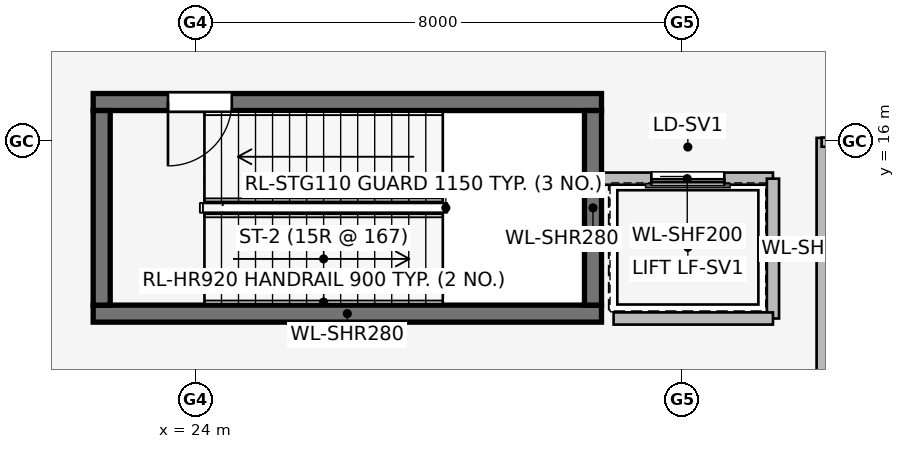
"""IFC4 building model, lengths in metres.
Left out: names, types, materials, properties, quantities, classifications, styles, units other than length and angle.
Written with IfcOpenShell. Run it as: python <this file> out.ifc"""

import sys

from ifc_helpers import new_model, si_unit, direction, frame, frame_2d, origin, place, context, subcontext, project, spatial, rectangle, extrude, element, fill, save


model = new_model("IFC4")
c1 = context("Model", 3, precision=1e-05, world=origin(), true_north=direction((0.0, 1.0)))
c2 = subcontext(c1, "Body", "Model", "MODEL_VIEW")
j1 = project(units=[si_unit("LENGTHUNIT", "METRE"), si_unit("PLANEANGLEUNIT", "RADIAN")], contexts=[c1])
p1 = place(None, origin())
s1 = spatial("IfcSite", under=j1, at=p1, CompositionType="ELEMENT")
p2 = place(p1, origin())
s2 = spatial("IfcBuilding", under=s1, at=p2, CompositionType="ELEMENT")
p3 = place(p2, frame((0.0, 0.0, 16.0)))
s3 = spatial("IfcBuildingStorey", under=s2, at=p3, CompositionType="ELEMENT", Elevation=16.0)
p4 = place(p3, frame((22.32, 13.16, 0.0), z_axis=(0.0, 0.0, 1.0), x_axis=(1.0, 0.0, 0.0)))
e1 = element("IfcWall", 1, at=p4, inside=s3, PredefinedType="SHEAR", context=c2, shape_type="SweptSolid", body=[
    extrude(rectangle(XDim=8.36, YDim=0.28, at=frame_2d((4.18, 0.0))), origin(), (0.0, 0.0, 1.0), 5.0),
])
p5 = place(p3, frame((30.68, 16.64, 0.0), z_axis=(0.0, 0.0, 1.0), x_axis=(-1.0, 0.0, 0.0)))
e2 = element("IfcWall", 2, at=p5, inside=s3, PredefinedType="SHEAR", context=c2, shape_type="SweptSolid", body=[
    extrude(rectangle(XDim=8.36, YDim=0.28, at=frame_2d((4.18, 0.0))), origin(), (0.0, 0.0, 1.0), 5.0),
])
p6 = place(p5, frame((6.08, 0.0, 0.0)))
e3 = element("IfcOpeningElement", 3, at=p6, cuts=e2, PredefinedType="OPENING", context=c2, shape_type="SweptSolid", body=[
    extrude(rectangle(XDim=1.05, YDim=2.0, at=frame_2d((0.525, 1.0))), frame((0.0, 0.15, 0.0), z_axis=(0.0, -1.0, 0.0), x_axis=(1.0, 0.0, 0.0)), (0.0, 0.0, 1.0), 0.3),
])
for number, where, z_axis, x_axis in (
    (4, (22.46, 16.5, 0.0), (0.0, 0.0, 1.0), (0.0, -1.0, 0.0)),
    (5, (30.54, 13.3, 0.0), (0.0, 0.0, 1.0), (0.0, 1.0, 0.0)),
):
    element("IfcWall", number, at=place(p3, frame(where, z_axis=z_axis, x_axis=x_axis)), inside=s3, PredefinedType="SHEAR", context=c2, shape_type="SweptSolid", body=[
        extrude(rectangle(XDim=3.2, YDim=0.28, at=frame_2d((1.6, 0.0))), origin(), (0.0, 0.0, 1.0), 5.0),
    ])
p7 = place(p3, frame((33.5, 15.38, 0.0), z_axis=(0.0, 0.0, 1.0), x_axis=(-1.0, 0.0, 0.0)))
e6 = element("IfcWall", 6, at=p7, inside=s3, PredefinedType="PARTITIONING", context=c2, shape_type="SweptSolid", body=[
    extrude(rectangle(XDim=2.82, YDim=0.2, at=frame_2d((1.41, 0.0))), origin(), (0.0, 0.0, 1.0), 4.58),
])
p8 = place(p7, frame((0.8, 0.0, 0.0)))
e7 = element("IfcOpeningElement", 7, at=p8, cuts=e6, PredefinedType="OPENING", context=c2, shape_type="SweptSolid", body=[
    extrude(rectangle(XDim=1.2, YDim=2.2, at=frame_2d((0.6, 1.1))), frame((0.0, 0.11, 0.0), z_axis=(0.0, -1.0, 0.0), x_axis=(1.0, 0.0, 0.0)), (0.0, 0.0, 1.0), 0.22),
])
p9 = place(p3, frame((33.5, 13.08, 0.0), z_axis=(0.0, 0.0, 1.0), x_axis=(0.0, 1.0, 0.0)))
e8 = element("IfcWall", 8, at=p9, inside=s3, PredefinedType="PARTITIONING", context=c2, shape_type="SweptSolid", body=[
    extrude(rectangle(XDim=2.3, YDim=0.2, at=frame_2d((1.15, 0.0))), origin(), (0.0, 0.0, 1.0), 4.58),
])
p10 = place(p3, frame((30.879, 13.08, 0.0), z_axis=(0.0, 0.0, 1.0), x_axis=(1.0, 0.0, 0.0)))
e9 = element("IfcWall", 9, at=p10, inside=s3, PredefinedType="PARTITIONING", context=c2, shape_type="SweptSolid", body=[
    extrude(rectangle(XDim=2.621, YDim=0.2, at=frame_2d((1.311, 0.0))), origin(), (0.0, 0.0, 1.0), 4.58),
])
p11 = place(p3, frame((34.3, 0.24, 0.0), z_axis=(0.0, 0.0, 1.0), x_axis=(0.0, 1.0, 0.0)))
e10 = element("IfcWall", 10, at=p11, inside=s3, PredefinedType="PARTITIONING", context=c2, shape_type="SweptSolid", body=[
    extrude(rectangle(XDim=15.81, YDim=0.165, at=frame_2d((7.905, 0.0))), origin(), (0.0, 0.0, 1.0), 4.58),
])
p12 = place(p3, frame((34.3, 15.98, 0.0), z_axis=(0.0, 0.0, 1.0), x_axis=(1.0, 0.0, 0.0)))
e11 = element("IfcWall", 11, at=p12, inside=s3, PredefinedType="PARTITIONING", context=c2, shape_type="SweptSolid", body=[
    extrude(rectangle(XDim=12.312, YDim=0.15, at=frame_2d((6.156, 0.0))), origin(), (0.0, 0.0, 1.0), 3.632),
])
p13 = place(p12, frame((5.676, 0.0, 0.0)))
e12 = element("IfcOpeningElement", 12, at=p13, cuts=e11, PredefinedType="OPENING", context=c2, shape_type="SweptSolid", body=[
    extrude(rectangle(XDim=0.96, YDim=2.0, at=frame_2d((0.48, 1.0))), frame((0.0, 0.085, 0.0), z_axis=(0.0, -1.0, 0.0), x_axis=(1.0, 0.0, 0.0)), (0.0, 0.0, 1.0), 0.17),
])
p14 = place(p6, origin())
e13 = element("IfcDoor", 13, at=p14, inside=s3, OperationType="SINGLE_SWING_RIGHT", PredefinedType="DOOR", context=c2, shape_type="SweptSolid", body=[
    extrude(rectangle(XDim=1.05, YDim=2.0, at=frame_2d((0.525, 1.0))), frame((0.0, 0.025, 0.0), z_axis=(0.0, -1.0, 0.0), x_axis=(1.0, 0.0, 0.0)), (0.0, 0.0, 1.0), 0.05),
])
fill(e3, e13)
p15 = place(p8, origin())
e14 = element("IfcDoor", 14, at=p15, inside=s3, OperationType="SLIDING_TO_RIGHT", PredefinedType="DOOR", context=c2, shape_type="SweptSolid", body=[
    extrude(rectangle(XDim=1.2, YDim=2.2, at=frame_2d((0.6, 1.1))), frame((0.0, 0.025, 0.0), z_axis=(0.0, -1.0, 0.0), x_axis=(1.0, 0.0, 0.0)), (0.0, 0.0, 1.0), 0.05),
])
fill(e7, e14)
save(model, sys.argv[1])
